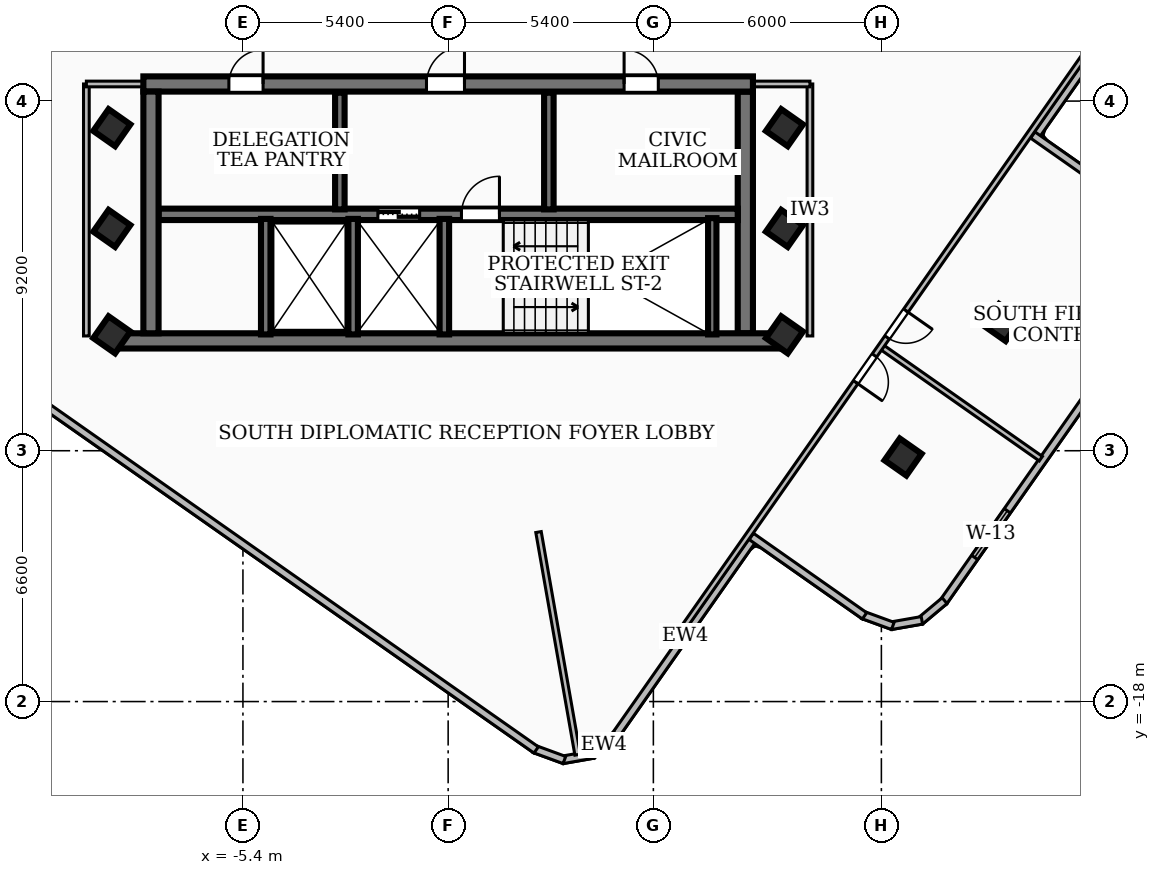
"""IFC4 building model, lengths in metres.
Left out: names, types, materials, properties, quantities, classifications, styles, units other than length and angle.
Written with IfcOpenShell. Run it as: python <this file> out.ifc"""

import sys

from ifc_helpers import new_model, si_unit, direction, frame, frame_2d, origin, origin_2d, place, context, subcontext, project, spatial, rectangle, extrude, element, fill, save


model = new_model("IFC4")
c1 = context("Model", 3, precision=1e-05, world=origin(), true_north=direction((0.0, 1.0)))
c2 = subcontext(c1, "Body", "Model", "MODEL_VIEW")
j1 = project(units=[si_unit("LENGTHUNIT", "METRE"), si_unit("PLANEANGLEUNIT", "RADIAN")], contexts=[c1])
p1 = place(None, origin())
s1 = spatial("IfcSite", under=j1, at=p1, CompositionType="ELEMENT")
p2 = place(p1, origin())
s2 = spatial("IfcBuilding", under=s1, at=p2, CompositionType="ELEMENT")
p3 = place(p2, frame((0.0, 0.0, 268.02)))
s3 = spatial("IfcBuildingStorey", under=s2, at=p3, CompositionType="ELEMENT", Elevation=268.02)
p4 = place(p3, frame((8.78, -8.51, 0.0), z_axis=(0.0, 0.0, 1.0), x_axis=(-1.0, 0.0, 0.0)))
e1 = element("IfcWall", 1, at=p4, inside=s3, PredefinedType="SHEAR", context=c2, shape_type="SweptSolid", body=[
    extrude(rectangle(XDim=17.56, YDim=0.4, at=frame_2d((8.78, 0.0))), origin(), (0.0, 0.0, 1.0), 3.16),
])
p5 = place(p3, frame((-8.02, -1.75, 0.0), z_axis=(0.0, 0.0, 1.0), x_axis=(1.0, 0.0, 0.0)))
e2 = element("IfcWall", 2, at=p5, inside=s3, PredefinedType="SHEAR", context=c2, shape_type="SweptSolid", body=[
    extrude(rectangle(XDim=16.04, YDim=0.4, at=frame_2d((8.02, 0.0))), origin(), (0.0, 0.0, 1.0), 3.16),
])
p6 = place(p5, frame((7.45, 0.0, 0.0)))
e3 = element("IfcOpeningElement", 3, at=p6, cuts=e2, PredefinedType="OPENING", context=c2, shape_type="SweptSolid", body=[
    extrude(rectangle(XDim=1.0, YDim=2.1, at=frame_2d((0.5, 1.05))), frame((0.0, 0.21, 0.0), z_axis=(0.0, -1.0, 0.0), x_axis=(1.0, 0.0, 0.0)), (0.0, 0.0, 1.0), 0.42),
])
p7 = place(p5, frame((12.65, 0.0, 0.0)))
e4 = element("IfcOpeningElement", 4, at=p7, cuts=e2, PredefinedType="OPENING", context=c2, shape_type="SweptSolid", body=[
    extrude(rectangle(XDim=0.9, YDim=2.06, at=frame_2d((0.45, 1.03))), frame((0.0, 0.21, 0.0), z_axis=(0.0, -1.0, 0.0), x_axis=(1.0, 0.0, 0.0)), (0.0, 0.0, 1.0), 0.42),
])
p8 = place(p5, frame((2.25, 0.0, 0.0)))
e5 = element("IfcOpeningElement", 5, at=p8, cuts=e2, PredefinedType="OPENING", context=c2, shape_type="SweptSolid", body=[
    extrude(rectangle(XDim=0.9, YDim=2.06, at=frame_2d((0.45, 1.03))), frame((0.0, 0.21, 0.0), z_axis=(0.0, -1.0, 0.0), x_axis=(1.0, 0.0, 0.0)), (0.0, 0.0, 1.0), 0.42),
])
for number, where, z_axis, x_axis in (
    (6, (-7.82, -8.31, 0.0), (0.0, 0.0, 1.0), (0.0, 1.0, 0.0)),
    (7, (7.82, -1.95, 0.0), (0.0, 0.0, 1.0), (0.0, -1.0, 0.0)),
):
    element("IfcWall", number, at=place(p3, frame(where, z_axis=z_axis, x_axis=x_axis)), inside=s3, PredefinedType="SHEAR", context=c2, shape_type="SweptSolid", body=[
        extrude(rectangle(XDim=6.36, YDim=0.4, at=frame_2d((3.18, 0.0))), origin(), (0.0, 0.0, 1.0), 3.16),
    ])
p9 = place(p3, frame((-7.62, -5.18, 0.0), z_axis=(0.0, 0.0, 1.0), x_axis=(1.0, 0.0, 0.0)))
e8 = element("IfcWall", 8, at=p9, inside=s3, PredefinedType="SOLIDWALL", context=c2, shape_type="SweptSolid", body=[
    extrude(rectangle(XDim=15.24, YDim=0.3, at=frame_2d((7.62, 0.0))), origin(), (0.0, 0.0, 1.0), 3.16),
])
p10 = place(p9, frame((5.77, 0.0, 0.0)))
e9 = element("IfcOpeningElement", 9, at=p10, cuts=e8, PredefinedType="OPENING", context=c2, shape_type="SweptSolid", body=[
    extrude(rectangle(XDim=1.1, YDim=2.15, at=frame_2d((0.55, 1.075))), frame((0.0, 0.16, 0.0), z_axis=(0.0, -1.0, 0.0), x_axis=(1.0, 0.0, 0.0)), (0.0, 0.0, 1.0), 0.32),
])
p11 = place(p9, frame((7.97, 0.0, 0.0)))
e10 = element("IfcOpeningElement", 10, at=p11, cuts=e8, PredefinedType="OPENING", context=c2, shape_type="SweptSolid", body=[
    extrude(rectangle(XDim=1.0, YDim=2.1, at=frame_2d((0.5, 1.05))), frame((0.0, 0.16, 0.0), z_axis=(0.0, -1.0, 0.0), x_axis=(1.0, 0.0, 0.0)), (0.0, 0.0, 1.0), 0.32),
])
p12 = place(p3, frame((6.95, -8.34, 0.0), z_axis=(0.0, 0.0, 1.0), x_axis=(0.0, 1.0, 0.0)))
e11 = element("IfcWall", 11, at=p12, inside=s3, PredefinedType="SOLIDWALL", context=c2, shape_type="SweptSolid", body=[
    extrude(rectangle(XDim=3.06, YDim=0.22, at=frame_2d((1.53, 0.0))), origin(), (0.0, 0.0, 1.0), 3.16),
])
for number, where, z_axis, x_axis in (
    (12, (-0.1, -8.34, 0.0), (0.0, 0.0, 1.0), (0.0, 1.0, 0.0)),
    (13, (-2.5, -8.34, 0.0), (0.0, 0.0, 1.0), (0.0, 1.0, 0.0)),
    (14, (-4.8, -8.34, 0.0), (0.0, 0.0, 1.0), (0.0, 1.0, 0.0)),
):
    element("IfcWall", number, at=place(p3, frame(where, z_axis=z_axis, x_axis=x_axis)), inside=s3, PredefinedType="SOLIDWALL", context=c2, shape_type="SweptSolid", body=[
        extrude(rectangle(XDim=3.04, YDim=0.25, at=frame_2d((1.52, 0.0))), origin(), (0.0, 0.0, 1.0), 3.16),
    ])
for number, where, z_axis, x_axis in (
    (15, (-2.85, -5.05, 0.0), (0.0, 0.0, 1.0), (0.0, 1.0, 0.0)),
    (16, (2.65, -5.05, 0.0), (0.0, 0.0, 1.0), (0.0, 1.0, 0.0)),
):
    element("IfcWall", number, at=place(p3, frame(where, z_axis=z_axis, x_axis=x_axis)), inside=s3, PredefinedType="SOLIDWALL", context=c2, shape_type="SweptSolid", body=[
        extrude(rectangle(XDim=3.07, YDim=0.25, at=frame_2d((1.535, 0.0))), origin(), (0.0, 0.0, 1.0), 3.16),
    ])
for number, where, z_axis, x_axis in (
    (17, (-8.85, -5.55, 0.0), (0.0, 0.0, 1.0), (0.574, 0.819, 0.0)),
    (18, (-8.85, -2.9, 0.0), (0.0, 0.0, 1.0), (0.574, 0.819, 0.0)),
    (19, (8.85, -5.55, 0.0), (0.0, 0.0, 1.0), (0.574, 0.819, 0.0)),
    (20, (8.85, -2.9, 0.0), (0.0, 0.0, 1.0), (0.574, 0.819, 0.0)),
    (21, (8.85, -8.35, 0.0), (0.0, 0.0, 1.0), (0.574, 0.819, 0.0)),
    (22, (-8.85, -8.35, 0.0), (0.0, 0.0, 1.0), (0.574, 0.819, 0.0)),
    (23, (11.971, -11.566, 0.0), (0.0, 0.0, 1.0), (0.574, 0.819, 0.0)),
    (24, (14.583, -8.026, 0.0), (0.0, 0.0, 1.0), (0.574, 0.819, 0.0)),
):
    element("IfcColumn", number, at=place(p3, frame(where, z_axis=z_axis, x_axis=x_axis)), inside=s3, PredefinedType="COLUMN", context=c2, shape_type="SweptSolid", body=[
        extrude(rectangle(XDim=0.7, YDim=0.7, at=origin_2d()), origin(), (0.0, 0.0, 1.0), 3.42),
    ])
p13 = place(p3, frame((8.088, -13.635, 0.0), z_axis=(0.0, 0.0, 1.0), x_axis=(-0.574286279317, -0.818654548261, 0.0)))
e25 = element("IfcWall", 25, at=p13, inside=s3, PredefinedType="SOLIDWALL", context=c2, shape_type="SweptSolid", body=[
    extrude(rectangle(XDim=6.441, YDim=0.2, at=frame_2d((3.22, 0.0))), origin(), (0.0, 0.0, 1.0), 3.16),
])
p14 = place(p3, frame((4.422, -18.872, 0.0), z_axis=(0.0, 0.0, 1.0), x_axis=(-0.766020352528, -0.642816318642, 0.0)))
e26 = element("IfcWall", 26, at=p14, inside=s3, PredefinedType="SOLIDWALL", context=c2, shape_type="SweptSolid", body=[
    extrude(rectangle(XDim=0.838, YDim=0.2, at=frame_2d((0.419, 0.0))), origin(), (0.0, 0.0, 1.0), 3.16),
])
p15 = place(p3, frame((3.824, -19.391, 0.0), z_axis=(0.0, 0.0, 1.0), x_axis=(-0.985118245285, -0.171877988141, 0.0)))
e27 = element("IfcWall", 27, at=p15, inside=s3, PredefinedType="SOLIDWALL", context=c2, shape_type="SweptSolid", body=[
    extrude(rectangle(XDim=0.825, YDim=0.2, at=frame_2d((0.413, 0.0))), origin(), (0.0, 0.0, 1.0), 3.16),
])
p16 = place(p3, frame((3.059, -19.538, 0.0), z_axis=(0.0, 0.0, 1.0), x_axis=(-0.938939131905, 0.344083284363, 0.0)))
e28 = element("IfcWall", 28, at=p16, inside=s3, PredefinedType="SOLIDWALL", context=c2, shape_type="SweptSolid", body=[
    extrude(rectangle(XDim=0.837, YDim=0.2, at=frame_2d((0.418, 0.0))), origin(), (0.0, 0.0, 1.0), 3.16),
])
p17 = place(p3, frame((2.316, -19.273, 0.0), z_axis=(0.0, 0.0, 1.0), x_axis=(-0.81873650559, 0.574169430059, 0.0)))
e29 = element("IfcWall", 29, at=p17, inside=s3, PredefinedType="SOLIDWALL", context=c2, shape_type="SweptSolid", body=[
    extrude(rectangle(XDim=25.923, YDim=0.2, at=frame_2d((12.961, 0.0))), origin(), (0.0, 0.0, 1.0), 3.16),
])
p18 = place(p17, frame((19.32, 0.0, 0.85)))
e30 = element("IfcOpeningElement", 30, at=p18, cuts=e29, PredefinedType="OPENING", context=c2, shape_type="SweptSolid", body=[
    extrude(rectangle(XDim=1.8, YDim=1.8, at=frame_2d((0.9, 0.9))), frame((0.0, 0.11, 0.0), z_axis=(0.0, -1.0, 0.0), x_axis=(1.0, 0.0, 0.0)), (0.0, 0.0, 1.0), 0.22),
])
p19 = place(p3, frame((19.273, 2.316, 0.0), z_axis=(0.0, 0.0, 1.0), x_axis=(-0.574227764949, -0.818695592978, 0.0)))
e31 = element("IfcWall", 31, at=p19, inside=s3, PredefinedType="SOLIDWALL", context=c2, shape_type="SweptSolid", body=[
    extrude(rectangle(XDim=6.741, YDim=0.2, at=frame_2d((3.371, 0.0))), origin(), (0.0, 0.0, 1.0), 3.16),
])
p20 = place(p3, frame((15.383, -3.092, 0.0), z_axis=(0.0, 0.0, 1.0), x_axis=(0.818664531158, -0.574272048269, 0.0)))
e32 = element("IfcWall", 32, at=p20, inside=s3, PredefinedType="SOLIDWALL", context=c2, shape_type="SweptSolid", body=[
    extrude(rectangle(XDim=3.641, YDim=0.2, at=frame_2d((1.821, 0.0))), origin(), (0.0, 0.0, 1.0), 3.16),
])
p21 = place(p3, frame((18.728, -7.257, 0.0), z_axis=(0.0, 0.0, 1.0), x_axis=(-0.574152395536, -0.818748451419, 0.0)))
e33 = element("IfcWall", 33, at=p21, inside=s3, PredefinedType="SOLIDWALL", context=c2, shape_type="SweptSolid", body=[
    extrude(rectangle(XDim=9.923, YDim=0.2, at=frame_2d((4.961, 0.0))), origin(), (0.0, 0.0, 1.0), 3.16),
])
p22 = place(p21, frame((6.99, 0.0, 0.85)))
e34 = element("IfcOpeningElement", 34, at=p22, cuts=e33, PredefinedType="OPENING", context=c2, shape_type="SweptSolid", body=[
    extrude(rectangle(XDim=1.5, YDim=1.8, at=frame_2d((0.75, 0.9))), frame((0.0, 0.11, 0.0), z_axis=(0.0, -1.0, 0.0), x_axis=(1.0, 0.0, 0.0)), (0.0, 0.0, 1.0), 0.22),
])
p23 = place(p3, frame((13.064, -15.345, 0.0), z_axis=(0.0, 0.0, 1.0), x_axis=(-0.766330415365, -0.642446647191, 0.0)))
e35 = element("IfcWall", 35, at=p23, inside=s3, PredefinedType="SOLIDWALL", context=c2, shape_type="SweptSolid", body=[
    extrude(rectangle(XDim=0.838, YDim=0.2, at=frame_2d((0.419, 0.0))), origin(), (0.0, 0.0, 1.0), 3.16),
])
p24 = place(p3, frame((12.466, -15.863, 0.0), z_axis=(0.0, 0.0, 1.0), x_axis=(-0.985118245285, -0.171877988141, 0.0)))
e36 = element("IfcWall", 36, at=p24, inside=s3, PredefinedType="SOLIDWALL", context=c2, shape_type="SweptSolid", body=[
    extrude(rectangle(XDim=0.825, YDim=0.2, at=frame_2d((0.413, 0.0))), origin(), (0.0, 0.0, 1.0), 3.16),
])
p25 = place(p3, frame((11.701, -16.01, 0.0), z_axis=(0.0, 0.0, 1.0), x_axis=(-0.939042573482, 0.343800880145, 0.0)))
e37 = element("IfcWall", 37, at=p25, inside=s3, PredefinedType="SOLIDWALL", context=c2, shape_type="SweptSolid", body=[
    extrude(rectangle(XDim=0.838, YDim=0.2, at=frame_2d((0.419, 0.0))), origin(), (0.0, 0.0, 1.0), 3.16),
])
p26 = place(p3, frame((10.957, -15.745, 0.0), z_axis=(0.0, 0.0, 1.0), x_axis=(-0.818576054501, 0.574398157202, 0.0)))
e38 = element("IfcWall", 38, at=p26, inside=s3, PredefinedType="SOLIDWALL", context=c2, shape_type="SweptSolid", body=[
    extrude(rectangle(XDim=3.64, YDim=0.2, at=frame_2d((1.82, 0.0))), origin(), (0.0, 0.0, 1.0), 3.16),
])
p27 = place(p3, frame((-9.52, -8.38, 0.0), z_axis=(0.0, 0.0, 1.0), x_axis=(0.0, 1.0, 0.0)))
e39 = element("IfcWall", 39, at=p27, inside=s3, PredefinedType="PARTITIONING", context=c2, shape_type="SweptSolid", body=[
    extrude(rectangle(XDim=6.63, YDim=0.15, at=frame_2d((3.315, 0.0))), origin(), (0.0, 0.0, 1.0), 3.16),
])
p28 = place(p3, frame((-7.85, -1.75, 0.0), z_axis=(0.0, 0.0, 1.0), x_axis=(-1.0, 0.0, 0.0)))
e40 = element("IfcWall", 40, at=p28, inside=s3, PredefinedType="PARTITIONING", context=c2, shape_type="SweptSolid", body=[
    extrude(rectangle(XDim=1.67, YDim=0.15, at=frame_2d((0.835, 0.0))), origin(), (0.0, 0.0, 1.0), 2.39),
])
p29 = place(p3, frame((9.52, -8.38, 0.0), z_axis=(0.0, 0.0, 1.0), x_axis=(0.0, 1.0, 0.0)))
e41 = element("IfcWall", 41, at=p29, inside=s3, PredefinedType="PARTITIONING", context=c2, shape_type="SweptSolid", body=[
    extrude(rectangle(XDim=6.63, YDim=0.15, at=frame_2d((3.315, 0.0))), origin(), (0.0, 0.0, 1.0), 2.53),
])
p30 = place(p3, frame((7.85, -1.75, 0.0), z_axis=(0.0, 0.0, 1.0), x_axis=(1.0, 0.0, 0.0)))
e42 = element("IfcWall", 42, at=p30, inside=s3, PredefinedType="PARTITIONING", context=c2, shape_type="SweptSolid", body=[
    extrude(rectangle(XDim=1.67, YDim=0.15, at=frame_2d((0.835, 0.0))), origin(), (0.0, 0.0, 1.0), 2.39),
])
p31 = place(p3, frame((2.378, -13.54, 0.0), z_axis=(0.0, 0.0, 1.0), x_axis=(0.173019547247, -0.984918390665, 0.0)))
e43 = element("IfcWall", 43, at=p31, inside=s3, PredefinedType="PARTITIONING", context=c2, shape_type="SweptSolid", body=[
    extrude(rectangle(XDim=5.948, YDim=0.145, at=frame_2d((2.974, 0.0))), origin(), (0.0, 0.0, 1.0), 3.16),
])
p32 = place(p3, frame((11.433, -8.689, 0.0), z_axis=(0.0, 0.0, 1.0), x_axis=(0.81868341552, -0.574245126363, 0.0)))
e44 = element("IfcWall", 44, at=p32, inside=s3, PredefinedType="PARTITIONING", context=c2, shape_type="SweptSolid", body=[
    extrude(rectangle(XDim=5.085, YDim=0.145, at=frame_2d((2.542, 0.0))), origin(), (0.0, 0.0, 1.0), 3.16),
])
p33 = place(p3, frame((17.625, 0.245, 0.0), z_axis=(0.0, 0.0, 1.0), x_axis=(-0.574126736534, -0.818766444352, 0.0)))
e45 = element("IfcWall", 45, at=p33, inside=s3, PredefinedType="PARTITIONING", context=c2, shape_type="SweptSolid", body=[
    extrude(rectangle(XDim=20.34, YDim=0.145, at=frame_2d((10.17, 0.0))), origin(), (0.0, 0.0, 1.0), 2.53),
])
p34 = place(p33, frame((11.16, 0.0, 0.0)))
e46 = element("IfcOpeningElement", 46, at=p34, cuts=e45, PredefinedType="OPENING", context=c2, shape_type="SweptSolid", body=[
    extrude(rectangle(XDim=0.86, YDim=2.04, at=frame_2d((0.43, 1.02))), frame((0.0, 0.083, 0.0), z_axis=(0.0, -1.0, 0.0), x_axis=(1.0, 0.0, 0.0)), (0.0, 0.0, 1.0), 0.165),
])
p35 = place(p33, frame((9.72, 0.0, 0.0)))
e47 = element("IfcOpeningElement", 47, at=p35, cuts=e45, PredefinedType="OPENING", context=c2, shape_type="SweptSolid", body=[
    extrude(rectangle(XDim=0.86, YDim=2.04, at=frame_2d((0.43, 1.02))), frame((0.0, 0.083, 0.0), z_axis=(0.0, -1.0, 0.0), x_axis=(1.0, 0.0, 0.0)), (0.0, 0.0, 1.0), 0.165),
])
p36 = place(p22, origin())
e48 = element("IfcWindow", 48, at=p36, inside=s3, PartitioningType="SINGLE_PANEL", PredefinedType="WINDOW", context=c2, shape_type="SweptSolid", body=[
    extrude(rectangle(XDim=1.5, YDim=1.8, at=frame_2d((0.75, 0.9))), frame((0.0, 0.03, 0.0), z_axis=(0.0, -1.0, 0.0), x_axis=(1.0, 0.0, 0.0)), (0.0, 0.0, 1.0), 0.06),
])
fill(e34, e48)
p37 = place(p6, origin())
e49 = element("IfcDoor", 49, at=p37, inside=s3, OperationType="SINGLE_SWING_RIGHT", PredefinedType="DOOR", context=c2, shape_type="SweptSolid", body=[
    extrude(rectangle(XDim=1.0, YDim=2.1, at=frame_2d((0.5, 1.05))), frame((0.0, 0.025, 0.0), z_axis=(0.0, -1.0, 0.0), x_axis=(1.0, 0.0, 0.0)), (0.0, 0.0, 1.0), 0.05),
])
fill(e3, e49)
p38 = place(p10, origin())
e50 = element("IfcDoor", 50, at=p38, inside=s3, OperationType="DOUBLE_DOOR_SLIDING", PredefinedType="DOOR", context=c2, shape_type="SweptSolid", body=[
    extrude(rectangle(XDim=1.1, YDim=2.15, at=frame_2d((0.55, 1.075))), frame((0.0, 0.025, 0.0), z_axis=(0.0, -1.0, 0.0), x_axis=(1.0, 0.0, 0.0)), (0.0, 0.0, 1.0), 0.05),
])
fill(e9, e50)
p39 = place(p11, origin())
e51 = element("IfcDoor", 51, at=p39, inside=s3, OperationType="SINGLE_SWING_RIGHT", PredefinedType="DOOR", context=c2, shape_type="SweptSolid", body=[
    extrude(rectangle(XDim=1.0, YDim=2.1, at=frame_2d((0.5, 1.05))), frame((0.0, 0.025, 0.0), z_axis=(0.0, -1.0, 0.0), x_axis=(1.0, 0.0, 0.0)), (0.0, 0.0, 1.0), 0.05),
])
fill(e10, e51)
p40 = place(p7, origin())
e52 = element("IfcDoor", 52, at=p40, inside=s3, OperationType="SINGLE_SWING_LEFT", PredefinedType="DOOR", context=c2, shape_type="SweptSolid", body=[
    extrude(rectangle(XDim=0.9, YDim=2.06, at=frame_2d((0.45, 1.03))), frame((0.0, 0.025, 0.0), z_axis=(0.0, -1.0, 0.0), x_axis=(1.0, 0.0, 0.0)), (0.0, 0.0, 1.0), 0.05),
])
fill(e4, e52)
p41 = place(p8, origin())
e53 = element("IfcDoor", 53, at=p41, inside=s3, OperationType="SINGLE_SWING_RIGHT", PredefinedType="DOOR", context=c2, shape_type="SweptSolid", body=[
    extrude(rectangle(XDim=0.9, YDim=2.06, at=frame_2d((0.45, 1.03))), frame((0.0, 0.025, 0.0), z_axis=(0.0, -1.0, 0.0), x_axis=(1.0, 0.0, 0.0)), (0.0, 0.0, 1.0), 0.05),
])
fill(e5, e53)
p42 = place(p34, origin())
e54 = element("IfcDoor", 54, at=p42, inside=s3, OperationType="SINGLE_SWING_RIGHT", PredefinedType="DOOR", context=c2, shape_type="SweptSolid", body=[
    extrude(rectangle(XDim=0.86, YDim=2.04, at=frame_2d((0.43, 1.02))), frame((0.0, 0.025, 0.0), z_axis=(0.0, -1.0, 0.0), x_axis=(1.0, 0.0, 0.0)), (0.0, 0.0, 1.0), 0.05),
])
fill(e46, e54)
p43 = place(p35, origin())
e55 = element("IfcDoor", 55, at=p43, inside=s3, OperationType="SINGLE_SWING_LEFT", PredefinedType="DOOR", context=c2, shape_type="SweptSolid", body=[
    extrude(rectangle(XDim=0.86, YDim=2.04, at=frame_2d((0.43, 1.02))), frame((0.0, 0.025, 0.0), z_axis=(0.0, -1.0, 0.0), x_axis=(1.0, 0.0, 0.0)), (0.0, 0.0, 1.0), 0.05),
])
fill(e47, e55)
save(model, sys.argv[1])
